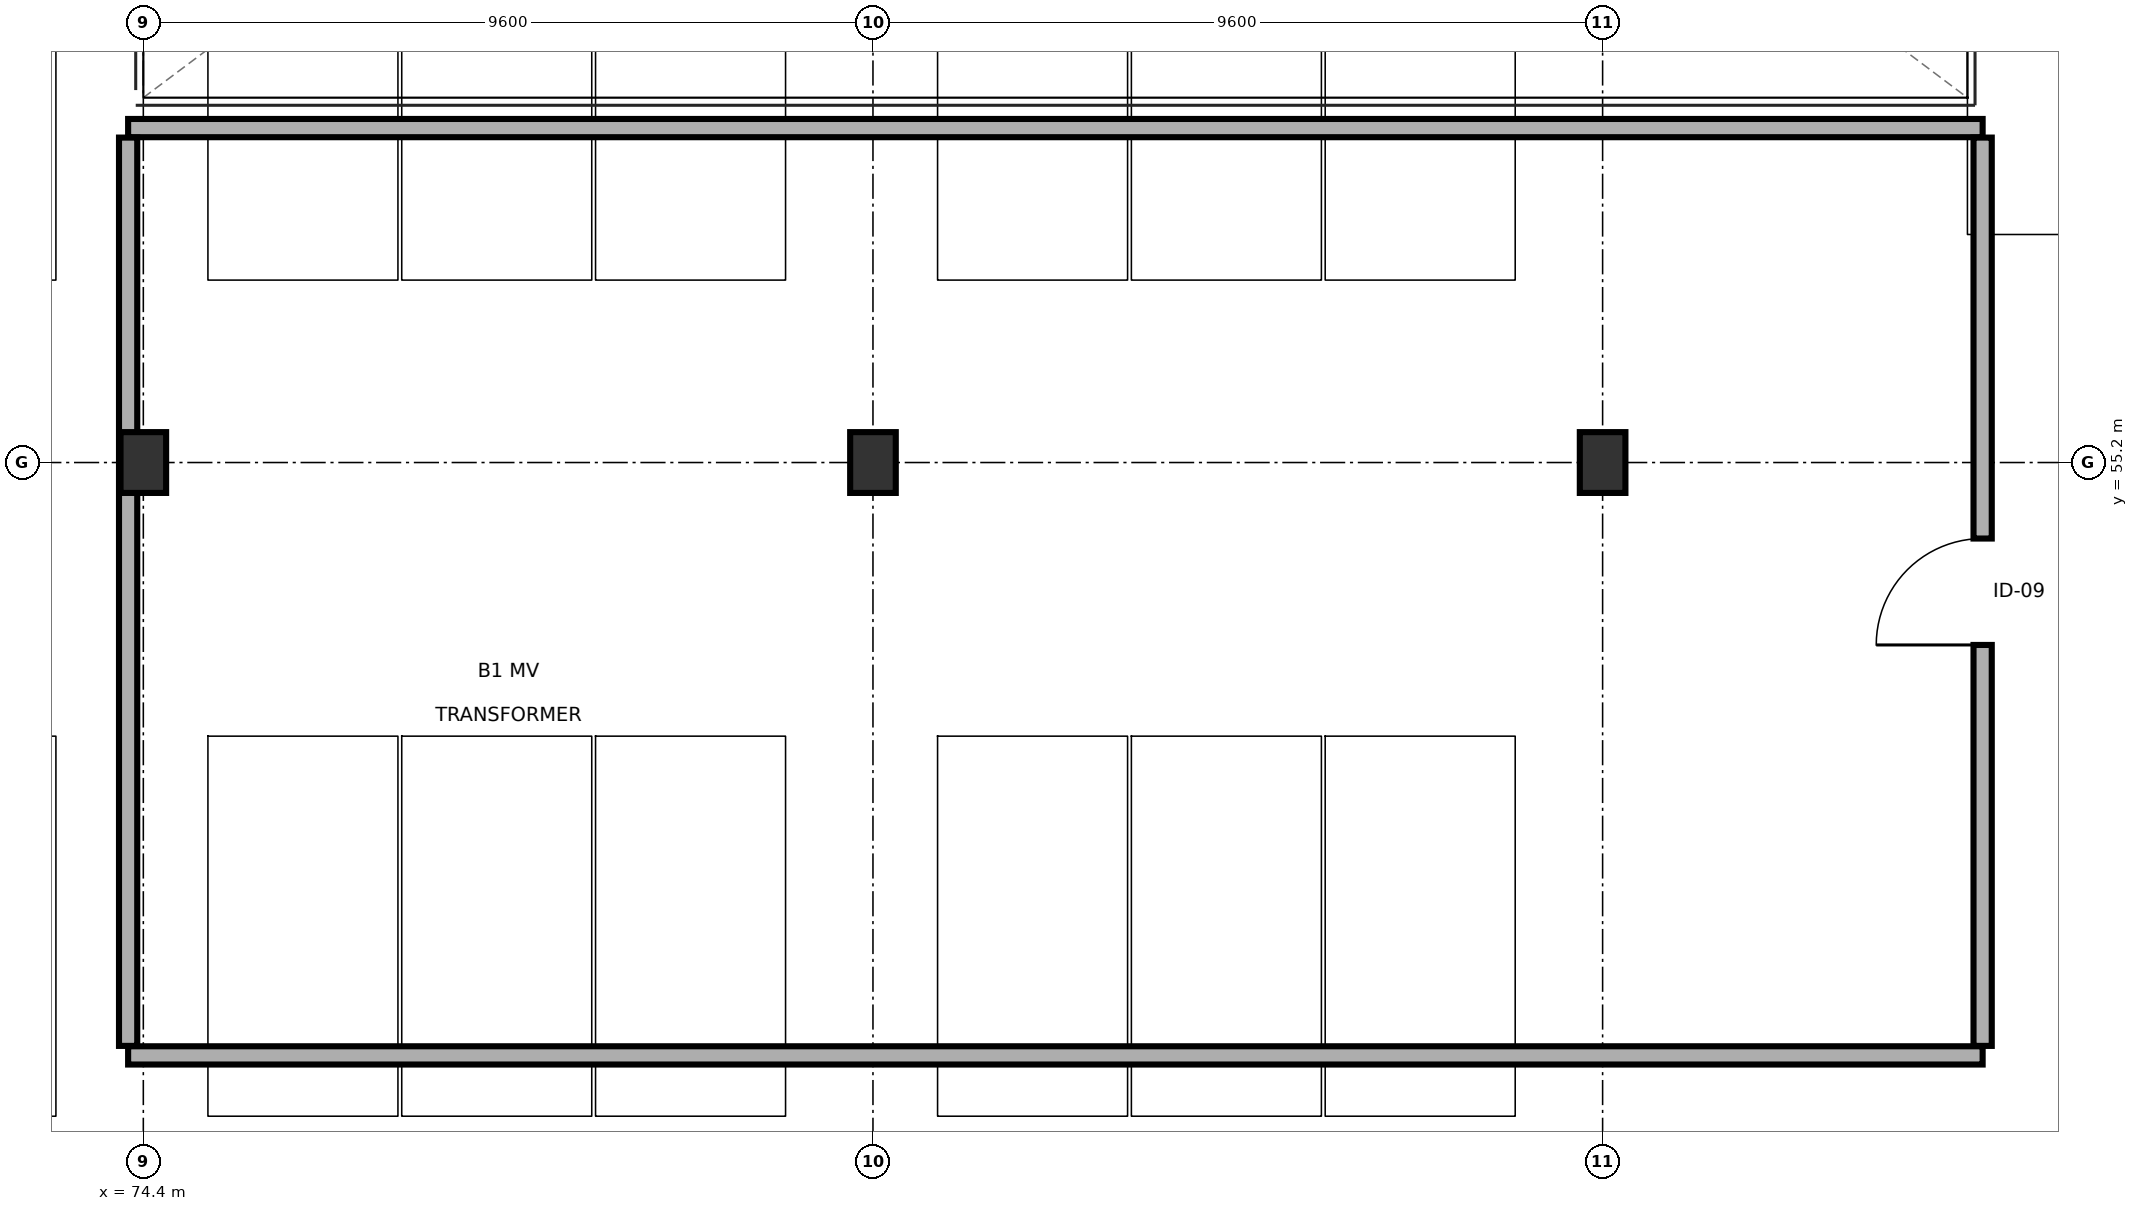
"""IFC4 building model, lengths in metres.
Left out: names, types, materials, properties, quantities, classifications, styles, units other than length and angle.
Written with IfcOpenShell. Run it as: python <this file> out.ifc"""

import sys

from ifc_helpers import new_model, si_unit, direction, frame, frame_2d, origin, origin_2d, place, context, subcontext, project, spatial, rectangle, extrude, element, fill, save


model = new_model("IFC4")
c1 = context("Model", 3, precision=1e-05, world=origin(), true_north=direction((0.0, 1.0)))
c2 = subcontext(c1, "Body", "Model", "MODEL_VIEW")
j1 = project(units=[si_unit("LENGTHUNIT", "METRE"), si_unit("PLANEANGLEUNIT", "RADIAN")], contexts=[c1])
p1 = place(None, origin())
s1 = spatial("IfcSite", under=j1, at=p1, CompositionType="ELEMENT")
p2 = place(p1, origin())
s2 = spatial("IfcBuilding", under=s1, at=p2, CompositionType="ELEMENT")
p3 = place(p2, frame((0.0, 0.0, -4.2)))
s3 = spatial("IfcBuildingStorey", under=s2, at=p3, CompositionType="ELEMENT", Elevation=-4.2)
for number, where, z_axis, x_axis in (
    (1, (74.4, 55.2, 0.0), (0.0, 0.0, 1.0), (1.0, 0.0, 0.0)),
    (2, (84.0, 55.2, 0.0), (0.0, 0.0, 1.0), (1.0, 0.0, 0.0)),
    (3, (93.6, 55.2, 0.0), (0.0, 0.0, 1.0), (1.0, 0.0, 0.0)),
):
    element("IfcColumn", number, at=place(p3, frame(where, z_axis=z_axis, x_axis=x_axis)), inside=s3, PredefinedType="COLUMN", context=c2, shape_type="SweptSolid", body=[
        extrude(rectangle(XDim=0.6, YDim=0.8, at=origin_2d()), origin(), (0.0, 0.0, 1.0), 4.2),
    ])
for number, where, z_axis, x_axis in (
    (4, (74.2, 47.4, 0.0), (0.0, 0.0, 1.0), (1.0, 0.0, 0.0)),
    (5, (74.2, 59.6, 0.0), (0.0, 0.0, 1.0), (1.0, 0.0, 0.0)),
):
    element("IfcWall", number, at=place(p3, frame(where, z_axis=z_axis, x_axis=x_axis)), inside=s3, PredefinedType="SOLIDWALL", context=c2, shape_type="SweptSolid", body=[
        extrude(rectangle(XDim=24.4, YDim=0.24, at=frame_2d((12.2, 0.0))), origin(), (0.0, 0.0, 1.0), 3.88),
    ])
p4 = place(p3, frame((74.2, 47.525, 0.0), z_axis=(0.0, 0.0, 1.0), x_axis=(0.0, 1.0, 0.0)))
e6 = element("IfcWall", 6, at=p4, inside=s3, PredefinedType="SOLIDWALL", context=c2, shape_type="SweptSolid", body=[
    extrude(rectangle(XDim=11.95, YDim=0.24, at=frame_2d((5.975, 0.0))), origin(), (0.0, 0.0, 1.0), 3.88),
])
p5 = place(p3, frame((98.6, 47.525, 0.0), z_axis=(0.0, 0.0, 1.0), x_axis=(0.0, 1.0, 0.0)))
e7 = element("IfcWall", 7, at=p5, inside=s3, PredefinedType="SOLIDWALL", context=c2, shape_type="SweptSolid", body=[
    extrude(rectangle(XDim=11.95, YDim=0.24, at=frame_2d((5.975, 0.0))), origin(), (0.0, 0.0, 1.0), 3.88),
])
p6 = place(p5, frame((5.275, 0.0, 0.0)))
e8 = element("IfcOpeningElement", 8, at=p6, cuts=e7, PredefinedType="OPENING", context=c2, shape_type="SweptSolid", body=[
    extrude(rectangle(XDim=1.4, YDim=2.2, at=frame_2d((0.7, 1.1))), frame((0.0, 0.13, 0.0), z_axis=(0.0, -1.0, 0.0), x_axis=(1.0, 0.0, 0.0)), (0.0, 0.0, 1.0), 0.26),
])
p7 = place(p6, origin())
e9 = element("IfcDoor", 9, at=p7, inside=s3, OperationType="SINGLE_SWING_LEFT", PredefinedType="DOOR", context=c2, shape_type="SweptSolid", body=[
    extrude(rectangle(XDim=1.4, YDim=2.2, at=frame_2d((0.7, 1.1))), frame((0.0, 0.025, 0.0), z_axis=(0.0, -1.0, 0.0), x_axis=(1.0, 0.0, 0.0)), (0.0, 0.0, 1.0), 0.05),
])
fill(e8, e9)
save(model, sys.argv[1])
